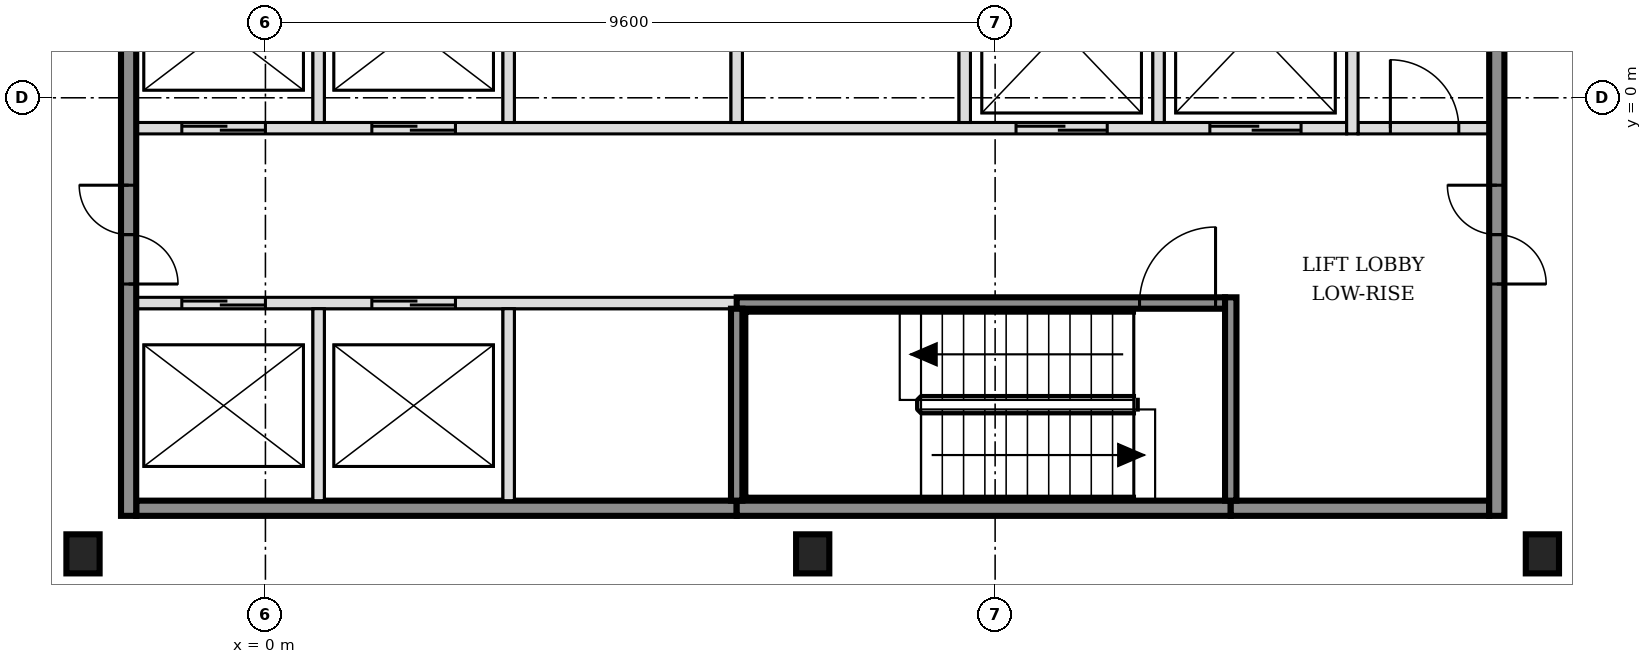
"""IFC4 building model, lengths in metres.
Left out: names, types, materials, properties, quantities, classifications, styles, units other than length and angle.
Written with IfcOpenShell. Run it as: python <this file> out.ifc"""

import sys

from ifc_helpers import new_model, si_unit, direction, frame, frame_2d, origin, origin_2d, place, context, subcontext, project, spatial, rectangle, i_section, extrude, element, fill, save


model = new_model("IFC4")
c1 = context("Model", 3, precision=1e-05, world=origin(), true_north=direction((0.0, 1.0)))
c2 = subcontext(c1, "Body", "Model", "MODEL_VIEW")
j1 = project(units=[si_unit("LENGTHUNIT", "METRE"), si_unit("PLANEANGLEUNIT", "RADIAN")], contexts=[c1])
p1 = place(None, origin())
s1 = spatial("IfcSite", under=j1, at=p1, CompositionType="ELEMENT")
p2 = place(p1, origin())
s2 = spatial("IfcBuilding", under=s1, at=p2, CompositionType="ELEMENT")
p3 = place(p2, frame((0.0, 0.0, 76.2)))
s3 = spatial("IfcBuildingStorey", under=s2, at=p3, CompositionType="ELEMENT", Elevation=76.2)
for number, where, z_axis, x_axis in (
    (1, (-2.4, -6.0, -0.15), (0.0, 0.0, 1.0), (1.0, 0.0, 0.0)),
    (2, (7.2, -6.0, -0.15), (0.0, 0.0, 1.0), (1.0, 0.0, 0.0)),
    (3, (16.8, -6.0, -0.15), (0.0, 0.0, 1.0), (1.0, 0.0, 0.0)),
):
    element("IfcColumn", number, at=place(p3, frame(where, z_axis=z_axis, x_axis=x_axis)), inside=s3, PredefinedType="COLUMN", context=c2, shape_type="SweptSolid", body=[
        extrude(i_section(OverallWidth=0.437, OverallDepth=0.514, WebThickness=0.061, FlangeThickness=0.097, FilletRadius=0.015, at=origin_2d()), origin(), (0.0, 0.0, 1.0), 3.6),
    ])
p4 = place(p3, frame((-1.7, -5.4, 0.0), z_axis=(0.0, 0.0, 1.0), x_axis=(1.0, 0.0, 0.0)))
e4 = element("IfcWall", 4, at=p4, inside=s3, PredefinedType="SOLIDWALL", context=c2, shape_type="SweptSolid", body=[
    extrude(rectangle(XDim=7.9, YDim=0.2, at=frame_2d((3.95, 0.0))), origin(), (0.0, 0.0, 1.0), 3.45),
])
p5 = place(p3, frame((6.2, -5.4, 0.0), z_axis=(0.0, 0.0, 1.0), x_axis=(1.0, 0.0, 0.0)))
e5 = element("IfcWall", 5, at=p5, inside=s3, PredefinedType="SOLIDWALL", context=c2, shape_type="SweptSolid", body=[
    extrude(rectangle(XDim=6.5, YDim=0.2, at=frame_2d((3.25, 0.0))), origin(), (0.0, 0.0, 1.0), 3.45),
])
p6 = place(p3, frame((12.7, -5.4, 0.0), z_axis=(0.0, 0.0, 1.0), x_axis=(1.0, 0.0, 0.0)))
e6 = element("IfcWall", 6, at=p6, inside=s3, PredefinedType="SOLIDWALL", context=c2, shape_type="SweptSolid", body=[
    extrude(rectangle(XDim=3.4, YDim=0.2, at=frame_2d((1.7, 0.0))), origin(), (0.0, 0.0, 1.0), 3.45),
])
p7 = place(p3, frame((-1.7, -2.7, 0.0), z_axis=(0.0, 0.0, 1.0), x_axis=(1.0, 0.0, 0.0)))
e7 = element("IfcWall", 7, at=p7, inside=s3, PredefinedType="SOLIDWALL", context=c2, shape_type="SweptSolid", body=[
    extrude(rectangle(XDim=7.9, YDim=0.15, at=frame_2d((3.95, 0.0))), origin(), (0.0, 0.0, 1.0), 3.45),
])
p8 = place(p7, frame((0.6, 0.0, 0.0)))
e8 = element("IfcOpeningElement", 8, at=p8, cuts=e7, PredefinedType="OPENING", context=c2, shape_type="SweptSolid", body=[
    extrude(rectangle(XDim=1.1, YDim=2.1, at=frame_2d((0.55, 1.05))), frame((0.0, 0.085, 0.0), z_axis=(0.0, -1.0, 0.0), x_axis=(1.0, 0.0, 0.0)), (0.0, 0.0, 1.0), 0.17),
])
p9 = place(p7, frame((3.1, 0.0, 0.0)))
e9 = element("IfcOpeningElement", 9, at=p9, cuts=e7, PredefinedType="OPENING", context=c2, shape_type="SweptSolid", body=[
    extrude(rectangle(XDim=1.1, YDim=2.1, at=frame_2d((0.55, 1.05))), frame((0.0, 0.085, 0.0), z_axis=(0.0, -1.0, 0.0), x_axis=(1.0, 0.0, 0.0)), (0.0, 0.0, 1.0), 0.17),
])
p10 = place(p3, frame((6.2, -2.7, 0.0), z_axis=(0.0, 0.0, 1.0), x_axis=(1.0, 0.0, 0.0)))
e10 = element("IfcWall", 10, at=p10, inside=s3, PredefinedType="SOLIDWALL", context=c2, shape_type="SweptSolid", body=[
    extrude(rectangle(XDim=6.425, YDim=0.15, at=frame_2d((3.212, 0.0))), origin(), (0.0, 0.0, 1.0), 3.45),
])
p11 = place(p10, frame((5.3, 0.0, 0.0)))
e11 = element("IfcOpeningElement", 11, at=p11, cuts=e10, PredefinedType="OPENING", context=c2, shape_type="SweptSolid", body=[
    extrude(rectangle(XDim=1.0, YDim=2.1, at=frame_2d((0.5, 1.05))), frame((0.0, 0.085, 0.0), z_axis=(0.0, -1.0, 0.0), x_axis=(1.0, 0.0, 0.0)), (0.0, 0.0, 1.0), 0.17),
])
p12 = place(p3, frame((-1.7, -0.4, 0.0), z_axis=(0.0, 0.0, 1.0), x_axis=(1.0, 0.0, 0.0)))
e12 = element("IfcWall", 12, at=p12, inside=s3, PredefinedType="SOLIDWALL", context=c2, shape_type="SweptSolid", body=[
    extrude(rectangle(XDim=15.925, YDim=0.15, at=frame_2d((7.962, 0.0))), origin(), (0.0, 0.0, 1.0), 3.45),
])
p13 = place(p12, frame((0.6, 0.0, 0.0)))
e13 = element("IfcOpeningElement", 13, at=p13, cuts=e12, PredefinedType="OPENING", context=c2, shape_type="SweptSolid", body=[
    extrude(rectangle(XDim=1.1, YDim=2.1, at=frame_2d((0.55, 1.05))), frame((0.0, 0.085, 0.0), z_axis=(0.0, -1.0, 0.0), x_axis=(1.0, 0.0, 0.0)), (0.0, 0.0, 1.0), 0.17),
])
p14 = place(p12, frame((3.1, 0.0, 0.0)))
e14 = element("IfcOpeningElement", 14, at=p14, cuts=e12, PredefinedType="OPENING", context=c2, shape_type="SweptSolid", body=[
    extrude(rectangle(XDim=1.1, YDim=2.1, at=frame_2d((0.55, 1.05))), frame((0.0, 0.085, 0.0), z_axis=(0.0, -1.0, 0.0), x_axis=(1.0, 0.0, 0.0)), (0.0, 0.0, 1.0), 0.17),
])
p15 = place(p12, frame((11.575, 0.0, 0.0)))
e15 = element("IfcOpeningElement", 15, at=p15, cuts=e12, PredefinedType="OPENING", context=c2, shape_type="SweptSolid", body=[
    extrude(rectangle(XDim=1.2, YDim=2.1, at=frame_2d((0.6, 1.05))), frame((0.0, 0.085, 0.0), z_axis=(0.0, -1.0, 0.0), x_axis=(1.0, 0.0, 0.0)), (0.0, 0.0, 1.0), 0.17),
])
p16 = place(p12, frame((14.125, 0.0, 0.0)))
e16 = element("IfcOpeningElement", 16, at=p16, cuts=e12, PredefinedType="OPENING", context=c2, shape_type="SweptSolid", body=[
    extrude(rectangle(XDim=1.2, YDim=2.1, at=frame_2d((0.6, 1.05))), frame((0.0, 0.085, 0.0), z_axis=(0.0, -1.0, 0.0), x_axis=(1.0, 0.0, 0.0)), (0.0, 0.0, 1.0), 0.17),
])
p17 = place(p3, frame((14.375, -0.4, 0.0), z_axis=(0.0, 0.0, 1.0), x_axis=(1.0, 0.0, 0.0)))
e17 = element("IfcWall", 17, at=p17, inside=s3, PredefinedType="PARTITIONING", context=c2, shape_type="SweptSolid", body=[
    extrude(rectangle(XDim=1.725, YDim=0.15, at=frame_2d((0.863, 0.0))), origin(), (0.0, 0.0, 1.0), 3.45),
])
p18 = place(p17, frame((0.425, 0.0, 0.0)))
e18 = element("IfcOpeningElement", 18, at=p18, cuts=e17, PredefinedType="OPENING", context=c2, shape_type="SweptSolid", body=[
    extrude(rectangle(XDim=0.9, YDim=2.1, at=frame_2d((0.45, 1.05))), frame((0.0, 0.085, 0.0), z_axis=(0.0, -1.0, 0.0), x_axis=(1.0, 0.0, 0.0)), (0.0, 0.0, 1.0), 0.17),
])
p19 = place(p3, frame((-1.8, -5.5, 0.0), z_axis=(0.0, 0.0, 1.0), x_axis=(0.0, 1.0, 0.0)))
e19 = element("IfcWall", 19, at=p19, inside=s3, PredefinedType="SOLIDWALL", context=c2, shape_type="SweptSolid", body=[
    extrude(rectangle(XDim=15.8, YDim=0.2, at=frame_2d((7.9, 0.0))), origin(), (0.0, 0.0, 1.0), 3.45),
])
p20 = place(p19, frame((3.05, 0.0, 0.0)))
e20 = element("IfcOpeningElement", 20, at=p20, cuts=e19, PredefinedType="OPENING", context=c2, shape_type="SweptSolid", body=[
    extrude(rectangle(XDim=1.3, YDim=2.1, at=frame_2d((0.65, 1.05))), frame((0.0, 0.11, 0.0), z_axis=(0.0, -1.0, 0.0), x_axis=(1.0, 0.0, 0.0)), (0.0, 0.0, 1.0), 0.22),
])
p21 = place(p19, frame((11.45, 0.0, 0.0)))
e21 = element("IfcOpeningElement", 21, at=p21, cuts=e19, PredefinedType="OPENING", context=c2, shape_type="SweptSolid", body=[
    extrude(rectangle(XDim=1.3, YDim=2.1, at=frame_2d((0.65, 1.05))), frame((0.0, 0.11, 0.0), z_axis=(0.0, -1.0, 0.0), x_axis=(1.0, 0.0, 0.0)), (0.0, 0.0, 1.0), 0.22),
])
p22 = place(p3, frame((0.7, -5.3, 0.0), z_axis=(0.0, 0.0, 1.0), x_axis=(0.0, 1.0, 0.0)))
e22 = element("IfcWall", 22, at=p22, inside=s3, PredefinedType="SOLIDWALL", context=c2, shape_type="SweptSolid", body=[
    extrude(rectangle(XDim=2.525, YDim=0.15, at=frame_2d((1.263, 0.0))), origin(), (0.0, 0.0, 1.0), 3.45),
])
p23 = place(p3, frame((0.7, -0.325, 0.0), z_axis=(0.0, 0.0, 1.0), x_axis=(0.0, 1.0, 0.0)))
e23 = element("IfcWall", 23, at=p23, inside=s3, PredefinedType="SOLIDWALL", context=c2, shape_type="SweptSolid", body=[
    extrude(rectangle(XDim=2.45, YDim=0.15, at=frame_2d((1.225, 0.0))), origin(), (0.0, 0.0, 1.0), 3.45),
])
p24 = place(p3, frame((3.2, -5.3, 0.0), z_axis=(0.0, 0.0, 1.0), x_axis=(0.0, 1.0, 0.0)))
e24 = element("IfcWall", 24, at=p24, inside=s3, PredefinedType="SOLIDWALL", context=c2, shape_type="SweptSolid", body=[
    extrude(rectangle(XDim=2.525, YDim=0.15, at=frame_2d((1.263, 0.0))), origin(), (0.0, 0.0, 1.0), 3.45),
])
p25 = place(p3, frame((3.2, -0.325, 0.0), z_axis=(0.0, 0.0, 1.0), x_axis=(0.0, 1.0, 0.0)))
e25 = element("IfcWall", 25, at=p25, inside=s3, PredefinedType="SOLIDWALL", context=c2, shape_type="SweptSolid", body=[
    extrude(rectangle(XDim=2.45, YDim=0.15, at=frame_2d((1.225, 0.0))), origin(), (0.0, 0.0, 1.0), 3.45),
])
p26 = place(p3, frame((6.2, -5.3, 0.0), z_axis=(0.0, 0.0, 1.0), x_axis=(0.0, 1.0, 0.0)))
e26 = element("IfcWall", 26, at=p26, inside=s3, PredefinedType="SOLIDWALL", context=c2, shape_type="SweptSolid", body=[
    extrude(rectangle(XDim=2.525, YDim=0.15, at=frame_2d((1.263, 0.0))), origin(), (0.0, 0.0, 1.0), 3.45),
])
for number, where, z_axis, x_axis in (
    (27, (6.2, -0.325, 0.0), (0.0, 0.0, 1.0), (0.0, 1.0, 0.0)),
    (28, (9.2, -0.325, 0.0), (0.0, 0.0, 1.0), (0.0, 1.0, 0.0)),
    (29, (11.75, -0.325, 0.0), (0.0, 0.0, 1.0), (0.0, 1.0, 0.0)),
):
    element("IfcWall", number, at=place(p3, frame(where, z_axis=z_axis, x_axis=x_axis)), inside=s3, PredefinedType="SOLIDWALL", context=c2, shape_type="SweptSolid", body=[
        extrude(rectangle(XDim=2.45, YDim=0.15, at=frame_2d((1.225, 0.0))), origin(), (0.0, 0.0, 1.0), 3.45),
    ])
p27 = place(p3, frame((12.7, -5.3, 0.0), z_axis=(0.0, 0.0, 1.0), x_axis=(0.0, 1.0, 0.0)))
e30 = element("IfcWall", 30, at=p27, inside=s3, PredefinedType="SOLIDWALL", context=c2, shape_type="SweptSolid", body=[
    extrude(rectangle(XDim=2.675, YDim=0.15, at=frame_2d((1.337, 0.0))), origin(), (0.0, 0.0, 1.0), 3.45),
])
p28 = place(p3, frame((14.3, -0.475, 0.0), z_axis=(0.0, 0.0, 1.0), x_axis=(0.0, 1.0, 0.0)))
e31 = element("IfcWall", 31, at=p28, inside=s3, PredefinedType="SOLIDWALL", context=c2, shape_type="SweptSolid", body=[
    extrude(rectangle(XDim=2.75, YDim=0.15, at=frame_2d((1.375, 0.0))), origin(), (0.0, 0.0, 1.0), 3.45),
])
p29 = place(p3, frame((16.2, -5.5, 0.0), z_axis=(0.0, 0.0, 1.0), x_axis=(0.0, 1.0, 0.0)))
e32 = element("IfcWall", 32, at=p29, inside=s3, PredefinedType="SOLIDWALL", context=c2, shape_type="SweptSolid", body=[
    extrude(rectangle(XDim=15.8, YDim=0.2, at=frame_2d((7.9, 0.0))), origin(), (0.0, 0.0, 1.0), 3.45),
])
p30 = place(p29, frame((3.05, 0.0, 0.0)))
e33 = element("IfcOpeningElement", 33, at=p30, cuts=e32, PredefinedType="OPENING", context=c2, shape_type="SweptSolid", body=[
    extrude(rectangle(XDim=1.3, YDim=2.1, at=frame_2d((0.65, 1.05))), frame((0.0, 0.11, 0.0), z_axis=(0.0, -1.0, 0.0), x_axis=(1.0, 0.0, 0.0)), (0.0, 0.0, 1.0), 0.22),
])
p31 = place(p29, frame((11.45, 0.0, 0.0)))
e34 = element("IfcOpeningElement", 34, at=p31, cuts=e32, PredefinedType="OPENING", context=c2, shape_type="SweptSolid", body=[
    extrude(rectangle(XDim=1.3, YDim=2.1, at=frame_2d((0.65, 1.05))), frame((0.0, 0.11, 0.0), z_axis=(0.0, -1.0, 0.0), x_axis=(1.0, 0.0, 0.0)), (0.0, 0.0, 1.0), 0.22),
])
p32 = place(p8, origin())
e35 = element("IfcDoor", 35, at=p32, inside=s3, OperationType="DOUBLE_DOOR_SLIDING", PredefinedType="DOOR", context=c2, shape_type="SweptSolid", body=[
    extrude(rectangle(XDim=1.1, YDim=2.1, at=frame_2d((0.55, 1.05))), frame((0.0, 0.025, 0.0), z_axis=(0.0, -1.0, 0.0), x_axis=(1.0, 0.0, 0.0)), (0.0, 0.0, 1.0), 0.05),
])
fill(e8, e35)
p33 = place(p9, origin())
e36 = element("IfcDoor", 36, at=p33, inside=s3, OperationType="DOUBLE_DOOR_SLIDING", PredefinedType="DOOR", context=c2, shape_type="SweptSolid", body=[
    extrude(rectangle(XDim=1.1, YDim=2.1, at=frame_2d((0.55, 1.05))), frame((0.0, 0.025, 0.0), z_axis=(0.0, -1.0, 0.0), x_axis=(1.0, 0.0, 0.0)), (0.0, 0.0, 1.0), 0.05),
])
fill(e9, e36)
p34 = place(p13, origin())
e37 = element("IfcDoor", 37, at=p34, inside=s3, OperationType="DOUBLE_DOOR_SLIDING", PredefinedType="DOOR", context=c2, shape_type="SweptSolid", body=[
    extrude(rectangle(XDim=1.1, YDim=2.1, at=frame_2d((0.55, 1.05))), frame((0.0, 0.025, 0.0), z_axis=(0.0, -1.0, 0.0), x_axis=(1.0, 0.0, 0.0)), (0.0, 0.0, 1.0), 0.05),
])
fill(e13, e37)
p35 = place(p14, origin())
e38 = element("IfcDoor", 38, at=p35, inside=s3, OperationType="DOUBLE_DOOR_SLIDING", PredefinedType="DOOR", context=c2, shape_type="SweptSolid", body=[
    extrude(rectangle(XDim=1.1, YDim=2.1, at=frame_2d((0.55, 1.05))), frame((0.0, 0.025, 0.0), z_axis=(0.0, -1.0, 0.0), x_axis=(1.0, 0.0, 0.0)), (0.0, 0.0, 1.0), 0.05),
])
fill(e14, e38)
p36 = place(p15, origin())
e39 = element("IfcDoor", 39, at=p36, inside=s3, OperationType="DOUBLE_DOOR_SLIDING", PredefinedType="DOOR", context=c2, shape_type="SweptSolid", body=[
    extrude(rectangle(XDim=1.2, YDim=2.1, at=frame_2d((0.6, 1.05))), frame((0.0, 0.025, 0.0), z_axis=(0.0, -1.0, 0.0), x_axis=(1.0, 0.0, 0.0)), (0.0, 0.0, 1.0), 0.05),
])
fill(e15, e39)
p37 = place(p16, origin())
e40 = element("IfcDoor", 40, at=p37, inside=s3, OperationType="DOUBLE_DOOR_SLIDING", PredefinedType="DOOR", context=c2, shape_type="SweptSolid", body=[
    extrude(rectangle(XDim=1.2, YDim=2.1, at=frame_2d((0.6, 1.05))), frame((0.0, 0.025, 0.0), z_axis=(0.0, -1.0, 0.0), x_axis=(1.0, 0.0, 0.0)), (0.0, 0.0, 1.0), 0.05),
])
fill(e16, e40)
p38 = place(p11, origin())
e41 = element("IfcDoor", 41, at=p38, inside=s3, OperationType="SINGLE_SWING_RIGHT", PredefinedType="DOOR", context=c2, shape_type="SweptSolid", body=[
    extrude(rectangle(XDim=1.0, YDim=2.1, at=frame_2d((0.5, 1.05))), frame((0.0, 0.025, 0.0), z_axis=(0.0, -1.0, 0.0), x_axis=(1.0, 0.0, 0.0)), (0.0, 0.0, 1.0), 0.05),
])
fill(e11, e41)
p39 = place(p20, origin())
e42 = element("IfcDoor", 42, at=p39, inside=s3, OperationType="DOUBLE_DOOR_SINGLE_SWING", PredefinedType="DOOR", context=c2, shape_type="SweptSolid", body=[
    extrude(rectangle(XDim=1.3, YDim=2.1, at=frame_2d((0.65, 1.05))), frame((0.0, 0.025, 0.0), z_axis=(0.0, -1.0, 0.0), x_axis=(1.0, 0.0, 0.0)), (0.0, 0.0, 1.0), 0.05),
])
fill(e20, e42)
p40 = place(p30, origin())
e43 = element("IfcDoor", 43, at=p40, inside=s3, OperationType="DOUBLE_DOOR_SINGLE_SWING", PredefinedType="DOOR", context=c2, shape_type="SweptSolid", body=[
    extrude(rectangle(XDim=1.3, YDim=2.1, at=frame_2d((0.65, 1.05))), frame((0.0, 0.025, 0.0), z_axis=(0.0, -1.0, 0.0), x_axis=(1.0, 0.0, 0.0)), (0.0, 0.0, 1.0), 0.05),
])
fill(e33, e43)
p41 = place(p18, origin())
e44 = element("IfcDoor", 44, at=p41, inside=s3, OperationType="SINGLE_SWING_LEFT", PredefinedType="DOOR", context=c2, shape_type="SweptSolid", body=[
    extrude(rectangle(XDim=0.9, YDim=2.1, at=frame_2d((0.45, 1.05))), frame((0.0, 0.025, 0.0), z_axis=(0.0, -1.0, 0.0), x_axis=(1.0, 0.0, 0.0)), (0.0, 0.0, 1.0), 0.05),
])
fill(e18, e44)
save(model, sys.argv[1])
